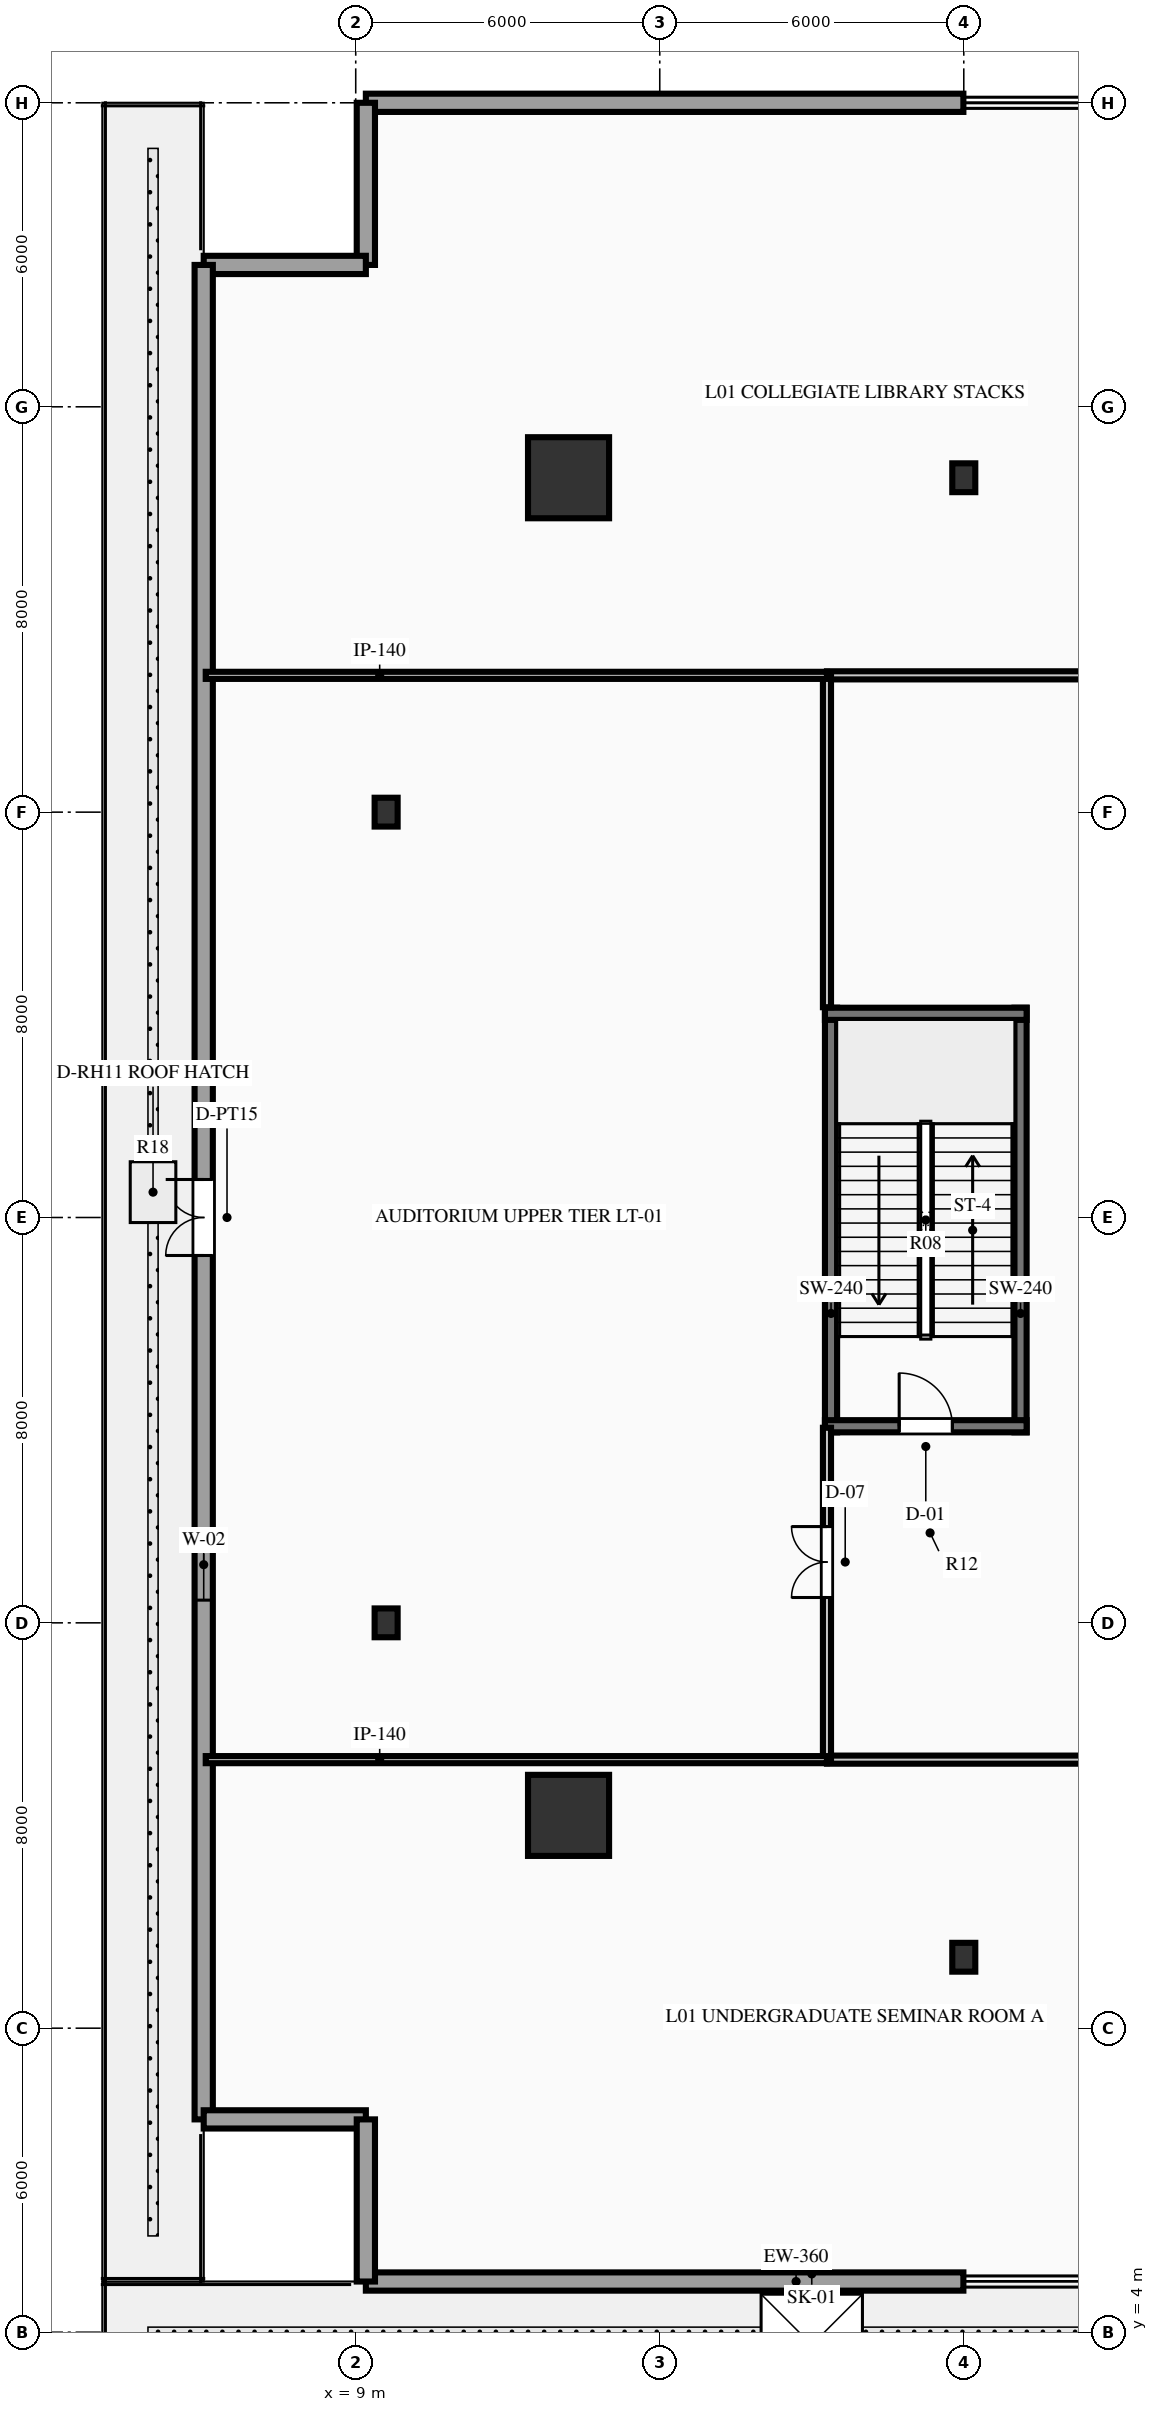
"""IFC4 building model, lengths in metres.
Left out: names, types, materials, properties, quantities, classifications, styles, units other than length and angle.
Written with IfcOpenShell. Run it as: python <this file> out.ifc"""

import sys

from ifc_helpers import new_model, si_unit, direction, frame, frame_2d, origin, origin_2d, place, context, subcontext, project, spatial, rectangle, hollow_rectangle, i_section, extrude, element, fill, save


model = new_model("IFC4")
c1 = context("Model", 3, precision=1e-05, world=origin(), true_north=direction((0.0, 1.0)))
c2 = subcontext(c1, "Body", "Model", "MODEL_VIEW")
j1 = project(units=[si_unit("LENGTHUNIT", "METRE"), si_unit("PLANEANGLEUNIT", "RADIAN")], contexts=[c1])
p1 = place(None, origin())
s1 = spatial("IfcSite", under=j1, at=p1, CompositionType="ELEMENT")
p2 = place(p1, origin())
s2 = spatial("IfcBuilding", under=s1, at=p2, CompositionType="ELEMENT")
p3 = place(p2, frame((0.0, 0.0, 6.0)))
s3 = spatial("IfcBuildingStorey", under=s2, at=p3, CompositionType="ELEMENT", Elevation=6.0)
for number, where, z_axis, x_axis in (
    (1, (18.38, 21.76, 0.0), (0.0, 0.0, 1.0), (0.0, 1.0, 0.0)),
    (2, (22.12, 21.76, 0.0), (0.0, 0.0, 1.0), (0.0, 1.0, 0.0)),
):
    element("IfcWall", number, at=place(p3, frame(where, z_axis=z_axis, x_axis=x_axis)), inside=s3, PredefinedType="SHEAR", context=c2, shape_type="SweptSolid", body=[
        extrude(rectangle(XDim=8.38, YDim=0.24, at=frame_2d((4.19, 0.0))), origin(), (0.0, 0.0, 1.0), 5.4),
    ])
p4 = place(p3, frame((18.26, 21.88, 0.0), z_axis=(0.0, 0.0, 1.0), x_axis=(1.0, 0.0, 0.0)))
e3 = element("IfcWall", 3, at=p4, inside=s3, PredefinedType="SHEAR", context=c2, shape_type="SweptSolid", body=[
    extrude(rectangle(XDim=3.98, YDim=0.24, at=frame_2d((1.99, 0.0))), origin(), (0.0, 0.0, 1.0), 5.4),
])
p5 = place(p4, frame((1.465, 0.0, 0.0)))
e4 = element("IfcOpeningElement", 4, at=p5, cuts=e3, PredefinedType="OPENING", context=c2, shape_type="SweptSolid", body=[
    extrude(rectangle(XDim=1.05, YDim=2.15, at=frame_2d((0.525, 1.075))), frame((0.0, 0.13, 0.0), z_axis=(0.0, -1.0, 0.0), x_axis=(1.0, 0.0, 0.0)), (0.0, 0.0, 1.0), 0.26),
])
p6 = place(p3, frame((18.26, 30.02, 0.0), z_axis=(0.0, 0.0, 1.0), x_axis=(1.0, 0.0, 0.0)))
e5 = element("IfcWall", 5, at=p6, inside=s3, PredefinedType="SHEAR", context=c2, shape_type="SweptSolid", body=[
    extrude(rectangle(XDim=3.98, YDim=0.24, at=frame_2d((1.99, 0.0))), origin(), (0.0, 0.0, 1.0), 5.4),
])
for number, where, z_axis, x_axis in (
    (6, (13.2, 14.2, 0.0), (0.0, 0.0, 1.0), (1.0, 0.0, 0.0)),
    (7, (13.2, 40.6, 0.0), (0.0, 0.0, 1.0), (1.0, 0.0, 0.0)),
):
    element("IfcColumn", number, at=place(p3, frame(where, z_axis=z_axis, x_axis=x_axis)), inside=s3, PredefinedType="COLUMN", context=c2, shape_type="SweptSolid", body=[
        extrude(hollow_rectangle(XDim=1.6, YDim=1.6, WallThickness=0.08, at=origin_2d()), origin(), (0.0, 0.0, 1.0), 5.4),
    ])
for number, where, z_axis, x_axis in (
    (8, (9.6, 18.0, 0.0), (0.0, 0.0, 1.0), (1.0, 0.0, 0.0)),
    (9, (9.6, 34.0, 0.0), (0.0, 0.0, 1.0), (1.0, 0.0, 0.0)),
    (10, (21.0, 11.4, 0.0), (0.0, 0.0, 1.0), (1.0, 0.0, 0.0)),
    (11, (21.0, 40.6, 0.0), (0.0, 0.0, 1.0), (1.0, 0.0, 0.0)),
):
    element("IfcColumn", number, at=place(p3, frame(where, z_axis=z_axis, x_axis=x_axis)), inside=s3, PredefinedType="COLUMN", context=c2, shape_type="SweptSolid", body=[
        extrude(i_section(OverallWidth=0.454, OverallDepth=0.569, WebThickness=0.078, FlangeThickness=0.125, at=origin_2d()), origin(), (0.0, 0.0, 1.0), 5.4),
    ])
for number, where, z_axis, x_axis in (
    (12, (20.992, 5.0, 0.0), (0.0, 0.0, 1.0), (-1.0, 0.0, 0.0)),
    (13, (9.2, 48.0, 0.0), (0.0, 0.0, 1.0), (1.0, 0.0, 0.0)),
):
    element("IfcWall", number, at=place(p3, frame(where, z_axis=z_axis, x_axis=x_axis)), inside=s3, PredefinedType="STANDARD", context=c2, shape_type="SweptSolid", body=[
        extrude(rectangle(XDim=11.792, YDim=0.36, at=frame_2d((5.896, 0.0))), origin(), (0.0, 0.0, 1.0), 5.07),
    ])
for number, where, z_axis, x_axis in (
    (14, (9.2, 44.8, 0.0), (0.0, 0.0, 1.0), (0.0, 1.0, 0.0)),
    (15, (6.0, 44.8, 0.0), (0.0, 0.0, 1.0), (1.0, 0.0, 0.0)),
):
    element("IfcWall", number, at=place(p3, frame(where, z_axis=z_axis, x_axis=x_axis)), inside=s3, PredefinedType="STANDARD", context=c2, shape_type="SweptSolid", body=[
        extrude(rectangle(XDim=3.2, YDim=0.36, at=frame_2d((1.6, 0.0))), origin(), (0.0, 0.0, 1.0), 5.07),
    ])
p7 = place(p3, frame((6.0, 8.2, 0.0), z_axis=(0.0, 0.0, 1.0), x_axis=(0.0, 1.0, 0.0)))
e16 = element("IfcWall", 16, at=p7, inside=s3, PredefinedType="STANDARD", context=c2, shape_type="SweptSolid", body=[
    extrude(rectangle(XDim=36.6, YDim=0.36, at=frame_2d((18.3, 0.0))), origin(), (0.0, 0.0, 1.0), 5.07),
])
p8 = place(p7, frame((17.05, 0.0, 0.0)))
e17 = element("IfcOpeningElement", 17, at=p8, cuts=e16, PredefinedType="OPENING", context=c2, shape_type="SweptSolid", body=[
    extrude(rectangle(XDim=1.5, YDim=2.25, at=frame_2d((0.75, 1.125))), frame((0.0, 0.19, 0.0), z_axis=(0.0, -1.0, 0.0), x_axis=(1.0, 0.0, 0.0)), (0.0, 0.0, 1.0), 0.38),
])
p9 = place(p7, frame((10.248, 0.0, 1.0)))
e18 = element("IfcOpeningElement", 18, at=p9, cuts=e16, PredefinedType="OPENING", context=c2, shape_type="SweptSolid", body=[
    extrude(rectangle(XDim=1.4, YDim=2.2, at=frame_2d((0.7, 1.1))), frame((0.0, 0.19, 0.0), z_axis=(0.0, -1.0, 0.0), x_axis=(1.0, 0.0, 0.0)), (0.0, 0.0, 1.0), 0.38),
])
for number, where, z_axis, x_axis in (
    (19, (9.2, 8.2, 0.0), (0.0, 0.0, 1.0), (-1.0, 0.0, 0.0)),
    (20, (9.2, 5.0, 0.0), (0.0, 0.0, 1.0), (0.0, 1.0, 0.0)),
):
    element("IfcWall", number, at=place(p3, frame(where, z_axis=z_axis, x_axis=x_axis)), inside=s3, PredefinedType="STANDARD", context=c2, shape_type="SweptSolid", body=[
        extrude(rectangle(XDim=3.2, YDim=0.36, at=frame_2d((1.6, 0.0))), origin(), (0.0, 0.0, 1.0), 5.07),
    ])
p10 = place(p3, frame((18.3, 15.3, 0.0), z_axis=(0.0, 0.0, 1.0), x_axis=(1.0, 0.0, 0.0)))
e21 = element("IfcWall", 21, at=p10, inside=s3, PredefinedType="PARTITIONING", context=c2, shape_type="SweptSolid", body=[
    extrude(rectangle(XDim=35.4, YDim=0.16, at=frame_2d((17.7, 0.0))), origin(), (0.0, 0.0, 1.0), 4.292),
])
p11 = place(p10, frame((5.125, 0.0, 0.0)))
e22 = element("IfcOpeningElement", 22, at=p11, cuts=e21, PredefinedType="OPENING", context=c2, shape_type="SweptSolid", body=[
    extrude(rectangle(XDim=1.05, YDim=2.15, at=frame_2d((0.525, 1.075))), frame((0.0, 0.09, 0.0), z_axis=(0.0, -1.0, 0.0), x_axis=(1.0, 0.0, 0.0)), (0.0, 0.0, 1.0), 0.18),
])
p12 = place(p10, frame((16.4, 0.0, 0.0)))
e23 = element("IfcOpeningElement", 23, at=p12, cuts=e21, PredefinedType="OPENING", context=c2, shape_type="SweptSolid", body=[
    extrude(rectangle(XDim=1.4, YDim=2.2, at=frame_2d((0.7, 1.1))), frame((0.0, 0.09, 0.0), z_axis=(0.0, -1.0, 0.0), x_axis=(1.0, 0.0, 0.0)), (0.0, 0.0, 1.0), 0.18),
])
p13 = place(p10, frame((28.625, 0.0, 0.0)))
e24 = element("IfcOpeningElement", 24, at=p13, cuts=e21, PredefinedType="OPENING", context=c2, shape_type="SweptSolid", body=[
    extrude(rectangle(XDim=1.05, YDim=2.15, at=frame_2d((0.525, 1.075))), frame((0.0, 0.09, 0.0), z_axis=(0.0, -1.0, 0.0), x_axis=(1.0, 0.0, 0.0)), (0.0, 0.0, 1.0), 0.18),
])
p14 = place(p3, frame((18.3, 36.7, 0.0), z_axis=(0.0, 0.0, 1.0), x_axis=(1.0, 0.0, 0.0)))
e25 = element("IfcWall", 25, at=p14, inside=s3, PredefinedType="PARTITIONING", context=c2, shape_type="SweptSolid", body=[
    extrude(rectangle(XDim=35.4, YDim=0.16, at=frame_2d((17.7, 0.0))), origin(), (0.0, 0.0, 1.0), 5.07),
])
p15 = place(p14, frame((5.325, 0.0, 0.0)))
e26 = element("IfcOpeningElement", 26, at=p15, cuts=e25, PredefinedType="OPENING", context=c2, shape_type="SweptSolid", body=[
    extrude(rectangle(XDim=1.05, YDim=2.15, at=frame_2d((0.525, 1.075))), frame((0.0, 0.09, 0.0), z_axis=(0.0, -1.0, 0.0), x_axis=(1.0, 0.0, 0.0)), (0.0, 0.0, 1.0), 0.18),
])
p16 = place(p14, frame((17.575, 0.0, 0.0)))
e27 = element("IfcOpeningElement", 27, at=p16, cuts=e25, PredefinedType="OPENING", context=c2, shape_type="SweptSolid", body=[
    extrude(rectangle(XDim=1.05, YDim=2.15, at=frame_2d((0.525, 1.075))), frame((0.0, 0.09, 0.0), z_axis=(0.0, -1.0, 0.0), x_axis=(1.0, 0.0, 0.0)), (0.0, 0.0, 1.0), 0.18),
])
p17 = place(p14, frame((27.225, 0.0, 0.0)))
e28 = element("IfcOpeningElement", 28, at=p17, cuts=e25, PredefinedType="OPENING", context=c2, shape_type="SweptSolid", body=[
    extrude(rectangle(XDim=0.95, YDim=2.15, at=frame_2d((0.475, 1.075))), frame((0.0, 0.09, 0.0), z_axis=(0.0, -1.0, 0.0), x_axis=(1.0, 0.0, 0.0)), (0.0, 0.0, 1.0), 0.18),
])
p18 = place(p14, frame((30.275, 0.0, 0.0)))
e29 = element("IfcOpeningElement", 29, at=p18, cuts=e25, PredefinedType="OPENING", context=c2, shape_type="SweptSolid", body=[
    extrude(rectangle(XDim=0.95, YDim=2.15, at=frame_2d((0.475, 1.075))), frame((0.0, 0.09, 0.0), z_axis=(0.0, -1.0, 0.0), x_axis=(1.0, 0.0, 0.0)), (0.0, 0.0, 1.0), 0.18),
])
p19 = place(p14, frame((33.3, 0.0, 0.0)))
e30 = element("IfcOpeningElement", 30, at=p19, cuts=e25, PredefinedType="OPENING", context=c2, shape_type="SweptSolid", body=[
    extrude(rectangle(XDim=1.0, YDim=2.15, at=frame_2d((0.5, 1.075))), frame((0.0, 0.09, 0.0), z_axis=(0.0, -1.0, 0.0), x_axis=(1.0, 0.0, 0.0)), (0.0, 0.0, 1.0), 0.18),
])
p20 = place(p3, frame((18.3, 15.3, 0.0), z_axis=(0.0, 0.0, 1.0), x_axis=(0.0, 1.0, 0.0)))
e31 = element("IfcWall", 31, at=p20, inside=s3, PredefinedType="PARTITIONING", context=c2, shape_type="SweptSolid", body=[
    extrude(rectangle(XDim=6.55, YDim=0.16, at=frame_2d((3.275, 0.0))), origin(), (0.0, 0.0, 1.0), 5.07),
])
p21 = place(p20, frame((3.2, 0.0, 0.0)))
e32 = element("IfcOpeningElement", 32, at=p21, cuts=e31, PredefinedType="OPENING", context=c2, shape_type="SweptSolid", body=[
    extrude(rectangle(XDim=1.4, YDim=2.2, at=frame_2d((0.7, 1.1))), frame((0.0, 0.09, 0.0), z_axis=(0.0, -1.0, 0.0), x_axis=(1.0, 0.0, 0.0)), (0.0, 0.0, 1.0), 0.18),
])
p22 = place(p3, frame((18.3, 30.15, 0.0), z_axis=(0.0, 0.0, 1.0), x_axis=(0.0, 1.0, 0.0)))
e33 = element("IfcWall", 33, at=p22, inside=s3, PredefinedType="PARTITIONING", context=c2, shape_type="SweptSolid", body=[
    extrude(rectangle(XDim=6.55, YDim=0.16, at=frame_2d((3.275, 0.0))), origin(), (0.0, 0.0, 1.0), 5.07),
])
p23 = place(p3, frame((6.04, 15.3, 0.0), z_axis=(0.0, 0.0, 1.0), x_axis=(1.0, 0.0, 0.0)))
e34 = element("IfcWall", 34, at=p23, inside=s3, PredefinedType="PARTITIONING", context=c2, shape_type="SweptSolid", body=[
    extrude(rectangle(XDim=12.26, YDim=0.14, at=frame_2d((6.13, 0.0))), origin(), (0.0, 0.0, 1.0), 4.292),
])
p24 = place(p3, frame((6.04, 36.7, 0.0), z_axis=(0.0, 0.0, 1.0), x_axis=(1.0, 0.0, 0.0)))
e35 = element("IfcWall", 35, at=p24, inside=s3, PredefinedType="PARTITIONING", context=c2, shape_type="SweptSolid", body=[
    extrude(rectangle(XDim=12.26, YDim=0.14, at=frame_2d((6.13, 0.0))), origin(), (0.0, 0.0, 1.0), 5.07),
])
p25 = place(p8, origin())
e36 = element("IfcDoor", 36, at=p25, inside=s3, OperationType="DOUBLE_DOOR_SINGLE_SWING", PredefinedType="DOOR", context=c2, shape_type="SweptSolid", body=[
    extrude(rectangle(XDim=1.5, YDim=2.25, at=frame_2d((0.75, 1.125))), frame((0.0, 0.025, 0.0), z_axis=(0.0, -1.0, 0.0), x_axis=(1.0, 0.0, 0.0)), (0.0, 0.0, 1.0), 0.05),
])
fill(e17, e36)
p26 = place(p9, origin())
e37 = element("IfcWindow", 37, at=p26, inside=s3, PartitioningType="SINGLE_PANEL", PredefinedType="WINDOW", context=c2, shape_type="SweptSolid", body=[
    extrude(rectangle(XDim=1.4, YDim=2.2, at=frame_2d((0.7, 1.1))), frame((0.0, 0.03, 0.0), z_axis=(0.0, -1.0, 0.0), x_axis=(1.0, 0.0, 0.0)), (0.0, 0.0, 1.0), 0.06),
])
fill(e18, e37)
p27 = place(p3, frame((0.0, 0.0, -0.25)))
p28 = place(p27, frame((18.0, 3.75, 0.2)))
e38 = element("IfcWindow", 38, at=p28, inside=s3, PartitioningType="SINGLE_PANEL", PredefinedType="SKYLIGHT", context=c2, shape_type="SweptSolid", body=[
    extrude(rectangle(XDim=2.0, YDim=2.0, at=origin_2d()), origin(), (0.0, 0.0, 1.0), 0.05),
])
p29 = place(p3, frame((0.0, 0.0, -0.25)))
p30 = place(p29, frame((5.0, 26.5, 0.2)))
e39 = element("IfcDoor", 39, at=p30, inside=s3, OperationType="SINGLE_SWING_LEFT", PredefinedType="TRAPDOOR", context=c2, shape_type="SweptSolid", body=[
    extrude(rectangle(XDim=0.9, YDim=1.2, at=origin_2d()), origin(), (0.0, 0.0, 1.0), 0.05),
])
p31 = place(p5, origin())
e40 = element("IfcDoor", 40, at=p31, inside=s3, OperationType="SINGLE_SWING_LEFT", PredefinedType="DOOR", context=c2, shape_type="SweptSolid", body=[
    extrude(rectangle(XDim=1.05, YDim=2.15, at=frame_2d((0.525, 1.075))), frame((0.0, 0.025, 0.0), z_axis=(0.0, -1.0, 0.0), x_axis=(1.0, 0.0, 0.0)), (0.0, 0.0, 1.0), 0.05),
])
fill(e4, e40)
p32 = place(p21, origin())
e41 = element("IfcDoor", 41, at=p32, inside=s3, OperationType="DOUBLE_DOOR_SINGLE_SWING", PredefinedType="DOOR", context=c2, shape_type="SweptSolid", body=[
    extrude(rectangle(XDim=1.4, YDim=2.2, at=frame_2d((0.7, 1.1))), frame((0.0, 0.025, 0.0), z_axis=(0.0, -1.0, 0.0), x_axis=(1.0, 0.0, 0.0)), (0.0, 0.0, 1.0), 0.05),
])
fill(e32, e41)
save(model, sys.argv[1])
